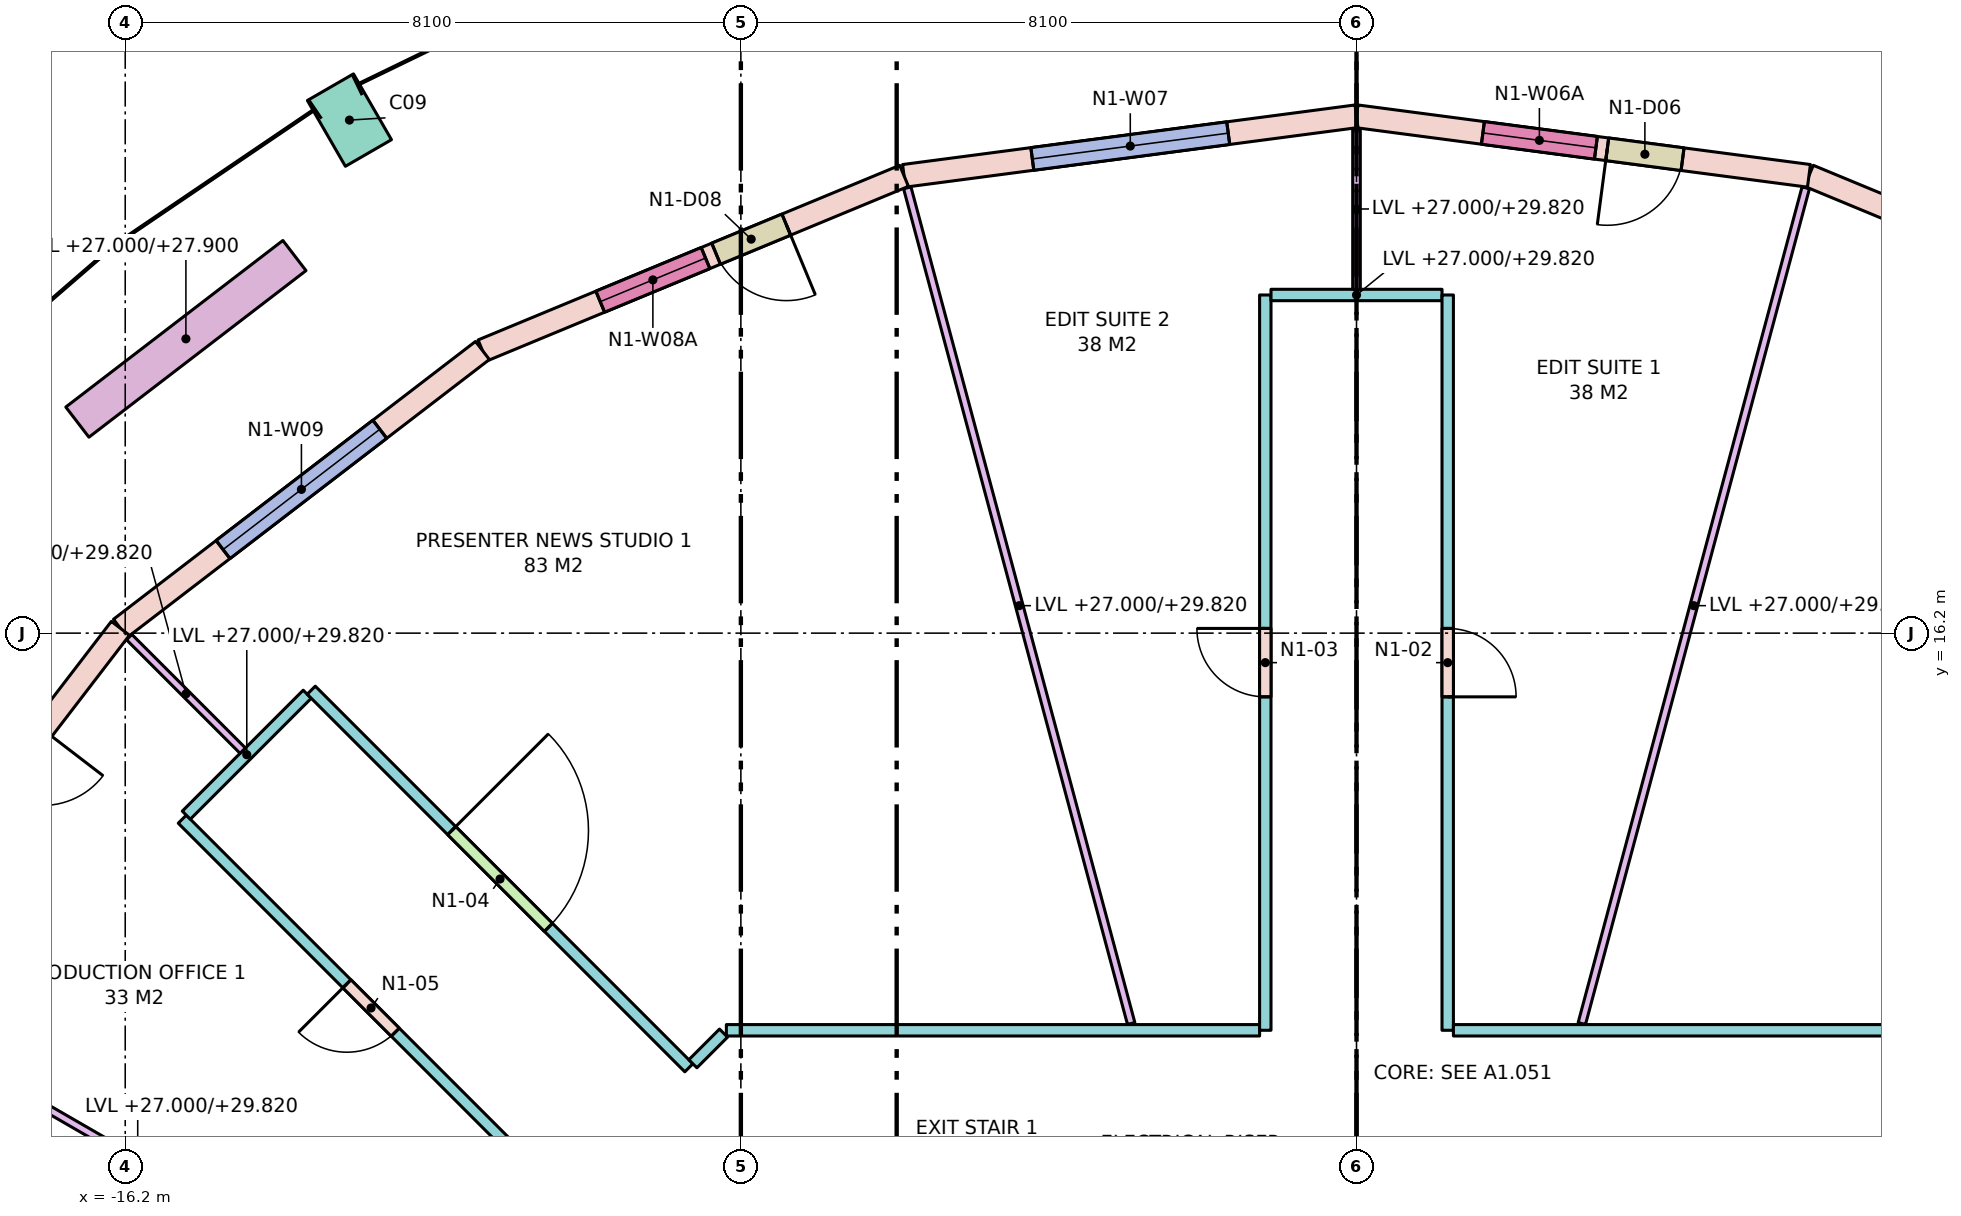
"""IFC4 building model, lengths in metres.
Left out: names, types, materials, properties, quantities, classifications, styles, units other than length and angle.
Written with IfcOpenShell. Run it as: python <this file> out.ifc"""

import sys

from ifc_helpers import new_model, si_unit, direction, frame, frame_2d, origin, origin_2d, place, context, subcontext, project, spatial, rectangle, extrude, element, fill, save


model = new_model("IFC4")
c1 = context("Model", 3, precision=1e-05, world=origin(), true_north=direction((0.0, 1.0)))
c2 = subcontext(c1, "Body", "Model", "MODEL_VIEW")
j1 = project(units=[si_unit("LENGTHUNIT", "METRE"), si_unit("PLANEANGLEUNIT", "RADIAN")], contexts=[c1])
p1 = place(None, origin())
s1 = spatial("IfcSite", under=j1, at=p1, CompositionType="ELEMENT")
p2 = place(p1, origin())
s2 = spatial("IfcBuilding", under=s1, at=p2, CompositionType="ELEMENT")
p3 = place(p2, frame((0.0, 0.0, 27.0)))
s3 = spatial("IfcBuildingStorey", under=s2, at=p3, CompositionType="ELEMENT", Elevation=27.0)
p4 = place(p3, frame((-13.25, 22.95, 0.0), z_axis=(0.0, 0.0, 1.0), x_axis=(-0.866025403784, -0.5, 0.0)))
e1 = element("IfcColumn", 1, at=p4, inside=s3, PredefinedType="COLUMN", context=c2, shape_type="SweptSolid", body=[
    extrude(rectangle(XDim=0.7, YDim=1.0, at=origin_2d()), origin(), (0.0, 0.0, 1.0), 4.0),
])
p5 = place(p3, frame((11.5, 19.919, 0.0), z_axis=(0.0, 0.0, 1.0), x_axis=(-0.923884511653, 0.382671411433, 0.0)))
e2 = element("IfcWall", 2, at=p5, inside=s3, PredefinedType="STANDARD", context=c2, shape_type="SweptSolid", body=[
    extrude(rectangle(XDim=6.004, YDim=0.3, at=frame_2d((3.002, 0.0))), origin(), (0.0, 0.0, 1.0), 3.72),
])
p6 = place(p5, frame((1.702, 0.0, 0.8)))
e3 = element("IfcOpeningElement", 3, at=p6, cuts=e2, PredefinedType="OPENING", context=c2, shape_type="SweptSolid", body=[
    extrude(rectangle(XDim=2.6, YDim=2.7, at=frame_2d((1.3, 1.35))), frame((0.0, 0.16, 0.0), z_axis=(0.0, -1.0, 0.0), x_axis=(1.0, 0.0, 0.0)), (0.0, 0.0, 1.0), 0.32),
])
p7 = place(p3, frame((5.953, 22.216, 0.0), z_axis=(0.0, 0.0, 1.0), x_axis=(-0.991445297315, 0.130522880875, 0.0)))
e4 = element("IfcWall", 4, at=p7, inside=s3, PredefinedType="STANDARD", context=c2, shape_type="SweptSolid", body=[
    extrude(rectangle(XDim=6.004, YDim=0.3, at=frame_2d((3.002, 0.0))), origin(), (0.0, 0.0, 1.0), 3.72),
])
p8 = place(p7, frame((1.677, 0.0, 0.0)))
e5 = element("IfcOpeningElement", 5, at=p8, cuts=e4, PredefinedType="OPENING", context=c2, shape_type="SweptSolid", body=[
    extrude(rectangle(XDim=1.0, YDim=2.4, at=frame_2d((0.5, 1.2))), frame((0.0, 0.16, 0.0), z_axis=(0.0, -1.0, 0.0), x_axis=(1.0, 0.0, 0.0)), (0.0, 0.0, 1.0), 0.32),
])
p9 = place(p7, frame((2.827, 0.0, 0.8)))
e6 = element("IfcOpeningElement", 6, at=p9, cuts=e4, PredefinedType="OPENING", context=c2, shape_type="SweptSolid", body=[
    extrude(rectangle(XDim=1.5, YDim=2.7, at=frame_2d((0.75, 1.35))), frame((0.0, 0.16, 0.0), z_axis=(0.0, -1.0, 0.0), x_axis=(1.0, 0.0, 0.0)), (0.0, 0.0, 1.0), 0.32),
])
p10 = place(p3, frame((0.0, 23.0, 0.0), z_axis=(0.0, 0.0, 1.0), x_axis=(-0.991445297315, -0.130522880875, 0.0)))
e7 = element("IfcWall", 7, at=p10, inside=s3, PredefinedType="STANDARD", context=c2, shape_type="SweptSolid", body=[
    extrude(rectangle(XDim=6.004, YDim=0.3, at=frame_2d((3.002, 0.0))), origin(), (0.0, 0.0, 1.0), 3.72),
])
p11 = place(p10, frame((1.702, 0.0, 0.8)))
e8 = element("IfcOpeningElement", 8, at=p11, cuts=e7, PredefinedType="OPENING", context=c2, shape_type="SweptSolid", body=[
    extrude(rectangle(XDim=2.6, YDim=2.7, at=frame_2d((1.3, 1.35))), frame((0.0, 0.16, 0.0), z_axis=(0.0, -1.0, 0.0), x_axis=(1.0, 0.0, 0.0)), (0.0, 0.0, 1.0), 0.32),
])
p12 = place(p3, frame((-5.953, 22.216, 0.0), z_axis=(0.0, 0.0, 1.0), x_axis=(-0.923884511653, -0.382671411433, 0.0)))
e9 = element("IfcWall", 9, at=p12, inside=s3, PredefinedType="STANDARD", context=c2, shape_type="SweptSolid", body=[
    extrude(rectangle(XDim=6.004, YDim=0.3, at=frame_2d((3.002, 0.0))), origin(), (0.0, 0.0, 1.0), 3.72),
])
p13 = place(p12, frame((1.677, 0.0, 0.0)))
e10 = element("IfcOpeningElement", 10, at=p13, cuts=e9, PredefinedType="OPENING", context=c2, shape_type="SweptSolid", body=[
    extrude(rectangle(XDim=1.0, YDim=2.4, at=frame_2d((0.5, 1.2))), frame((0.0, 0.16, 0.0), z_axis=(0.0, -1.0, 0.0), x_axis=(1.0, 0.0, 0.0)), (0.0, 0.0, 1.0), 0.32),
])
p14 = place(p12, frame((2.827, 0.0, 0.8)))
e11 = element("IfcOpeningElement", 11, at=p14, cuts=e9, PredefinedType="OPENING", context=c2, shape_type="SweptSolid", body=[
    extrude(rectangle(XDim=1.5, YDim=2.7, at=frame_2d((0.75, 1.35))), frame((0.0, 0.16, 0.0), z_axis=(0.0, -1.0, 0.0), x_axis=(1.0, 0.0, 0.0)), (0.0, 0.0, 1.0), 0.32),
])
p15 = place(p3, frame((-11.5, 19.919, 0.0), z_axis=(0.0, 0.0, 1.0), x_axis=(-0.793339924758, -0.608778912074, 0.0)))
e12 = element("IfcWall", 12, at=p15, inside=s3, PredefinedType="STANDARD", context=c2, shape_type="SweptSolid", body=[
    extrude(rectangle(XDim=6.004, YDim=0.3, at=frame_2d((3.002, 0.0))), origin(), (0.0, 0.0, 1.0), 3.72),
])
p16 = place(p15, frame((1.702, 0.0, 0.8)))
e13 = element("IfcOpeningElement", 13, at=p16, cuts=e12, PredefinedType="OPENING", context=c2, shape_type="SweptSolid", body=[
    extrude(rectangle(XDim=2.6, YDim=2.7, at=frame_2d((1.3, 1.35))), frame((0.0, 0.16, 0.0), z_axis=(0.0, -1.0, 0.0), x_axis=(1.0, 0.0, 0.0)), (0.0, 0.0, 1.0), 0.32),
])
p17 = place(p3, frame((-16.263, 16.263, 0.0), z_axis=(0.0, 0.0, 1.0), x_axis=(-0.608778912074, -0.793339924758, 0.0)))
e14 = element("IfcWall", 14, at=p17, inside=s3, PredefinedType="STANDARD", context=c2, shape_type="SweptSolid", body=[
    extrude(rectangle(XDim=6.004, YDim=0.3, at=frame_2d((3.002, 0.0))), origin(), (0.0, 0.0, 1.0), 3.72),
])
p18 = place(p17, frame((1.677, 0.0, 0.0)))
e15 = element("IfcOpeningElement", 15, at=p18, cuts=e14, PredefinedType="OPENING", context=c2, shape_type="SweptSolid", body=[
    extrude(rectangle(XDim=1.0, YDim=2.4, at=frame_2d((0.5, 1.2))), frame((0.0, 0.16, 0.0), z_axis=(0.0, -1.0, 0.0), x_axis=(1.0, 0.0, 0.0)), (0.0, 0.0, 1.0), 0.32),
])
p19 = place(p17, frame((2.827, 0.0, 0.8)))
e16 = element("IfcOpeningElement", 16, at=p19, cuts=e14, PredefinedType="OPENING", context=c2, shape_type="SweptSolid", body=[
    extrude(rectangle(XDim=1.5, YDim=2.7, at=frame_2d((0.75, 1.35))), frame((0.0, 0.16, 0.0), z_axis=(0.0, -1.0, 0.0), x_axis=(1.0, 0.0, 0.0)), (0.0, 0.0, 1.0), 0.32),
])
p20 = place(p3, frame((-13.974, 21.167, 0.0), z_axis=(0.0, 0.0, 1.0), x_axis=(-0.793359599829, -0.608753271334, 0.0)))
e17 = element("IfcWall", 17, at=p20, inside=s3, PredefinedType="PARAPET", context=c2, shape_type="SweptSolid", body=[
    extrude(rectangle(XDim=3.6, YDim=0.5, at=frame_2d((1.8, 0.0))), origin(), (0.0, 0.0, 1.0), 0.9),
])
p21 = place(p3, frame((-10.481, 8.784, 0.0), z_axis=(0.0, 0.0, 1.0), x_axis=(-0.707124155885, 0.707089406061, 0.0)))
e18 = element("IfcWall", 18, at=p21, inside=s3, PredefinedType="PARTITIONING", context=c2, shape_type="SweptSolid", body=[
    extrude(rectangle(XDim=7.026, YDim=0.15, at=frame_2d((3.513, 0.0))), origin(), (0.0, 0.0, 1.0), 3.72),
])
p22 = place(p21, frame((3.063, 0.0, 0.0)))
e19 = element("IfcOpeningElement", 19, at=p22, cuts=e18, PredefinedType="OPENING", context=c2, shape_type="SweptSolid", body=[
    extrude(rectangle(XDim=0.9, YDim=2.1, at=frame_2d((0.45, 1.05))), frame((0.0, 0.085, 0.0), z_axis=(0.0, -1.0, 0.0), x_axis=(1.0, 0.0, 0.0)), (0.0, 0.0, 1.0), 0.17),
])
p23 = place(p3, frame((-15.396, 13.805, 0.0), z_axis=(0.0, 0.0, 1.0), x_axis=(0.707106781187, 0.707106781187, 0.0)))
e20 = element("IfcWall", 20, at=p23, inside=s3, PredefinedType="PARTITIONING", context=c2, shape_type="SweptSolid", body=[
    extrude(rectangle(XDim=2.25, YDim=0.15, at=frame_2d((1.125, 0.0))), origin(), (0.0, 0.0, 1.0), 2.82),
])
p24 = place(p3, frame((-13.752, 15.449, 0.0), z_axis=(0.0, 0.0, 1.0), x_axis=(0.707089406061, -0.707124155885, 0.0)))
e21 = element("IfcWall", 21, at=p24, inside=s3, PredefinedType="PARTITIONING", context=c2, shape_type="SweptSolid", body=[
    extrude(rectangle(XDim=7.026, YDim=0.15, at=frame_2d((3.513, 0.0))), origin(), (0.0, 0.0, 1.0), 3.72),
])
p25 = place(p24, frame((2.613, 0.0, 0.0)))
e22 = element("IfcOpeningElement", 22, at=p25, cuts=e21, PredefinedType="OPENING", context=c2, shape_type="SweptSolid", body=[
    extrude(rectangle(XDim=1.8, YDim=2.1, at=frame_2d((0.9, 1.05))), frame((0.0, 0.085, 0.0), z_axis=(0.0, -1.0, 0.0), x_axis=(1.0, 0.0, 0.0)), (0.0, 0.0, 1.0), 0.17),
])
p26 = place(p3, frame((-8.731, 10.534, 0.0), z_axis=(0.0, 0.0, 1.0), x_axis=(0.707106781187, 0.707106781187, 0.0)))
e23 = element("IfcWall", 23, at=p26, inside=s3, PredefinedType="PARTITIONING", context=c2, shape_type="SweptSolid", body=[
    extrude(rectangle(XDim=0.571, YDim=0.15, at=frame_2d((0.285, 0.0))), origin(), (0.0, 0.0, 1.0), 3.72),
])
p27 = place(p3, frame((-8.291, 10.975, 0.0), z_axis=(0.0, 0.0, 1.0), x_axis=(1.0, 0.0, 0.0)))
e24 = element("IfcWall", 24, at=p27, inside=s3, PredefinedType="PARTITIONING", context=c2, shape_type="SweptSolid", body=[
    extrude(rectangle(XDim=7.016, YDim=0.15, at=frame_2d((3.508, 0.0))), origin(), (0.0, 0.0, 1.0), 2.82),
])
p28 = place(p3, frame((-1.2, 10.975, 0.0), z_axis=(0.0, 0.0, 1.0), x_axis=(0.0, 1.0, 0.0)))
e25 = element("IfcWall", 25, at=p28, inside=s3, PredefinedType="PARTITIONING", context=c2, shape_type="SweptSolid", body=[
    extrude(rectangle(XDim=9.674, YDim=0.15, at=frame_2d((4.837, 0.0))), origin(), (0.0, 0.0, 1.0), 3.72),
])
p29 = place(p28, frame((4.387, 0.0, 0.0)))
e26 = element("IfcOpeningElement", 26, at=p29, cuts=e25, PredefinedType="OPENING", context=c2, shape_type="SweptSolid", body=[
    extrude(rectangle(XDim=0.9, YDim=2.1, at=frame_2d((0.45, 1.05))), frame((0.0, 0.085, 0.0), z_axis=(0.0, -1.0, 0.0), x_axis=(1.0, 0.0, 0.0)), (0.0, 0.0, 1.0), 0.17),
])
p30 = place(p3, frame((-1.125, 20.649, 0.0), z_axis=(0.0, 0.0, 1.0), x_axis=(1.0, 0.0, 0.0)))
e27 = element("IfcWall", 27, at=p30, inside=s3, PredefinedType="PARTITIONING", context=c2, shape_type="SweptSolid", body=[
    extrude(rectangle(XDim=2.25, YDim=0.15, at=frame_2d((1.125, 0.0))), origin(), (0.0, 0.0, 1.0), 2.82),
])
p31 = place(p3, frame((1.2, 20.649, 0.0), z_axis=(0.0, 0.0, 1.0), x_axis=(0.0, -1.0, 0.0)))
e28 = element("IfcWall", 28, at=p31, inside=s3, PredefinedType="PARTITIONING", context=c2, shape_type="SweptSolid", body=[
    extrude(rectangle(XDim=9.674, YDim=0.15, at=frame_2d((4.837, 0.0))), origin(), (0.0, 0.0, 1.0), 3.72),
])
p32 = place(p31, frame((4.387, 0.0, 0.0)))
e29 = element("IfcOpeningElement", 29, at=p32, cuts=e28, PredefinedType="OPENING", context=c2, shape_type="SweptSolid", body=[
    extrude(rectangle(XDim=0.9, YDim=2.1, at=frame_2d((0.45, 1.05))), frame((0.0, 0.085, 0.0), z_axis=(0.0, -1.0, 0.0), x_axis=(1.0, 0.0, 0.0)), (0.0, 0.0, 1.0), 0.17),
])
p33 = place(p3, frame((1.275, 10.975, 0.0), z_axis=(0.0, 0.0, 1.0), x_axis=(1.0, 0.0, 0.0)))
e30 = element("IfcWall", 30, at=p33, inside=s3, PredefinedType="PARTITIONING", context=c2, shape_type="SweptSolid", body=[
    extrude(rectangle(XDim=7.016, YDim=0.15, at=frame_2d((3.508, 0.0))), origin(), (0.0, 0.0, 1.0), 2.82),
])
p34 = place(p3, frame((2.965, 11.064, 0.0), z_axis=(0.0, 0.0, 1.0), x_axis=(0.258827930947, 0.965923445291, 0.0)))
e31 = element("IfcWall", 31, at=p34, inside=s3, PredefinedType="PARTITIONING", context=c2, shape_type="SweptSolid", body=[
    extrude(rectangle(XDim=11.382, YDim=0.1, at=frame_2d((5.691, 0.0))), origin(), (0.0, 0.0, 1.0), 2.82),
])
p35 = place(p3, frame((0.0, 20.724, 0.0), z_axis=(0.0, 0.0, 1.0), x_axis=(0.0, 1.0, 0.0)))
e32 = element("IfcWall", 32, at=p35, inside=s3, PredefinedType="PARTITIONING", context=c2, shape_type="SweptSolid", body=[
    extrude(rectangle(XDim=2.113, YDim=0.1, at=frame_2d((1.057, 0.0))), origin(), (0.0, 0.0, 1.0), 2.82),
])
p36 = place(p3, frame((-2.965, 11.064, 0.0), z_axis=(0.0, 0.0, 1.0), x_axis=(-0.258827930947, 0.965923445291, 0.0)))
e33 = element("IfcWall", 33, at=p36, inside=s3, PredefinedType="PARTITIONING", context=c2, shape_type="SweptSolid", body=[
    extrude(rectangle(XDim=11.382, YDim=0.1, at=frame_2d((5.691, 0.0))), origin(), (0.0, 0.0, 1.0), 2.82),
])
p37 = place(p3, frame((-14.654, 14.654, 0.0), z_axis=(0.0, 0.0, 1.0), x_axis=(-0.707106781187, 0.707106781187, 0.0)))
e34 = element("IfcWall", 34, at=p37, inside=s3, PredefinedType="PARTITIONING", context=c2, shape_type="SweptSolid", body=[
    extrude(rectangle(XDim=2.113, YDim=0.1, at=frame_2d((1.057, 0.0))), origin(), (0.0, 0.0, 1.0), 2.82),
])
p38 = place(p3, frame((-12.294, 7.098, 0.0), z_axis=(0.0, 0.0, 1.0), x_axis=(-0.866010547425, 0.500025731086, 0.0)))
e35 = element("IfcWall", 35, at=p38, inside=s3, PredefinedType="PARTITIONING", context=c2, shape_type="SweptSolid", body=[
    extrude(rectangle(XDim=8.641, YDim=0.1, at=frame_2d((4.32, 0.0))), origin(), (0.0, 0.0, 1.0), 2.82),
])
p39 = place(p8, origin())
e36 = element("IfcDoor", 36, at=p39, inside=s3, OperationType="SINGLE_SWING_RIGHT", PredefinedType="DOOR", context=c2, shape_type="SweptSolid", body=[
    extrude(rectangle(XDim=1.0, YDim=2.4, at=frame_2d((0.5, 1.2))), frame((0.0, 0.025, 0.0), z_axis=(0.0, -1.0, 0.0), x_axis=(1.0, 0.0, 0.0)), (0.0, 0.0, 1.0), 0.05),
])
fill(e5, e36)
p40 = place(p9, origin())
e37 = element("IfcWindow", 37, at=p40, inside=s3, PartitioningType="SINGLE_PANEL", PredefinedType="WINDOW", context=c2, shape_type="SweptSolid", body=[
    extrude(rectangle(XDim=1.5, YDim=2.7, at=frame_2d((0.75, 1.35))), frame((0.0, 0.03, 0.0), z_axis=(0.0, -1.0, 0.0), x_axis=(1.0, 0.0, 0.0)), (0.0, 0.0, 1.0), 0.06),
])
fill(e6, e37)
p41 = place(p11, origin())
e38 = element("IfcWindow", 38, at=p41, inside=s3, PartitioningType="SINGLE_PANEL", PredefinedType="WINDOW", context=c2, shape_type="SweptSolid", body=[
    extrude(rectangle(XDim=2.6, YDim=2.7, at=frame_2d((1.3, 1.35))), frame((0.0, 0.03, 0.0), z_axis=(0.0, -1.0, 0.0), x_axis=(1.0, 0.0, 0.0)), (0.0, 0.0, 1.0), 0.06),
])
fill(e8, e38)
p42 = place(p13, origin())
e39 = element("IfcDoor", 39, at=p42, inside=s3, OperationType="SINGLE_SWING_LEFT", PredefinedType="DOOR", context=c2, shape_type="SweptSolid", body=[
    extrude(rectangle(XDim=1.0, YDim=2.4, at=frame_2d((0.5, 1.2))), frame((0.0, 0.025, 0.0), z_axis=(0.0, -1.0, 0.0), x_axis=(1.0, 0.0, 0.0)), (0.0, 0.0, 1.0), 0.05),
])
fill(e10, e39)
p43 = place(p14, origin())
e40 = element("IfcWindow", 40, at=p43, inside=s3, PartitioningType="SINGLE_PANEL", PredefinedType="WINDOW", context=c2, shape_type="SweptSolid", body=[
    extrude(rectangle(XDim=1.5, YDim=2.7, at=frame_2d((0.75, 1.35))), frame((0.0, 0.03, 0.0), z_axis=(0.0, -1.0, 0.0), x_axis=(1.0, 0.0, 0.0)), (0.0, 0.0, 1.0), 0.06),
])
fill(e11, e40)
p44 = place(p16, origin())
e41 = element("IfcWindow", 41, at=p44, inside=s3, PartitioningType="SINGLE_PANEL", PredefinedType="WINDOW", context=c2, shape_type="SweptSolid", body=[
    extrude(rectangle(XDim=2.6, YDim=2.7, at=frame_2d((1.3, 1.35))), frame((0.0, 0.03, 0.0), z_axis=(0.0, -1.0, 0.0), x_axis=(1.0, 0.0, 0.0)), (0.0, 0.0, 1.0), 0.06),
])
fill(e13, e41)
p45 = place(p32, origin())
e42 = element("IfcDoor", 42, at=p45, inside=s3, OperationType="SINGLE_SWING_RIGHT", PredefinedType="DOOR", context=c2, shape_type="SweptSolid", body=[
    extrude(rectangle(XDim=0.9, YDim=2.1, at=frame_2d((0.45, 1.05))), frame((0.0, 0.025, 0.0), z_axis=(0.0, -1.0, 0.0), x_axis=(1.0, 0.0, 0.0)), (0.0, 0.0, 1.0), 0.05),
])
fill(e29, e42)
p46 = place(p29, origin())
e43 = element("IfcDoor", 43, at=p46, inside=s3, OperationType="SINGLE_SWING_RIGHT", PredefinedType="DOOR", context=c2, shape_type="SweptSolid", body=[
    extrude(rectangle(XDim=0.9, YDim=2.1, at=frame_2d((0.45, 1.05))), frame((0.0, 0.025, 0.0), z_axis=(0.0, -1.0, 0.0), x_axis=(1.0, 0.0, 0.0)), (0.0, 0.0, 1.0), 0.05),
])
fill(e26, e43)
p47 = place(p25, origin())
e44 = element("IfcDoor", 44, at=p47, inside=s3, OperationType="DOUBLE_DOOR_SINGLE_SWING", PredefinedType="DOOR", context=c2, shape_type="SweptSolid", body=[
    extrude(rectangle(XDim=1.8, YDim=2.1, at=frame_2d((0.9, 1.05))), frame((0.0, 0.025, 0.0), z_axis=(0.0, -1.0, 0.0), x_axis=(1.0, 0.0, 0.0)), (0.0, 0.0, 1.0), 0.05),
])
fill(e22, e44)
p48 = place(p22, origin())
e45 = element("IfcDoor", 45, at=p48, inside=s3, OperationType="SINGLE_SWING_RIGHT", PredefinedType="DOOR", context=c2, shape_type="SweptSolid", body=[
    extrude(rectangle(XDim=0.9, YDim=2.1, at=frame_2d((0.45, 1.05))), frame((0.0, 0.025, 0.0), z_axis=(0.0, -1.0, 0.0), x_axis=(1.0, 0.0, 0.0)), (0.0, 0.0, 1.0), 0.05),
])
fill(e19, e45)
save(model, sys.argv[1])
